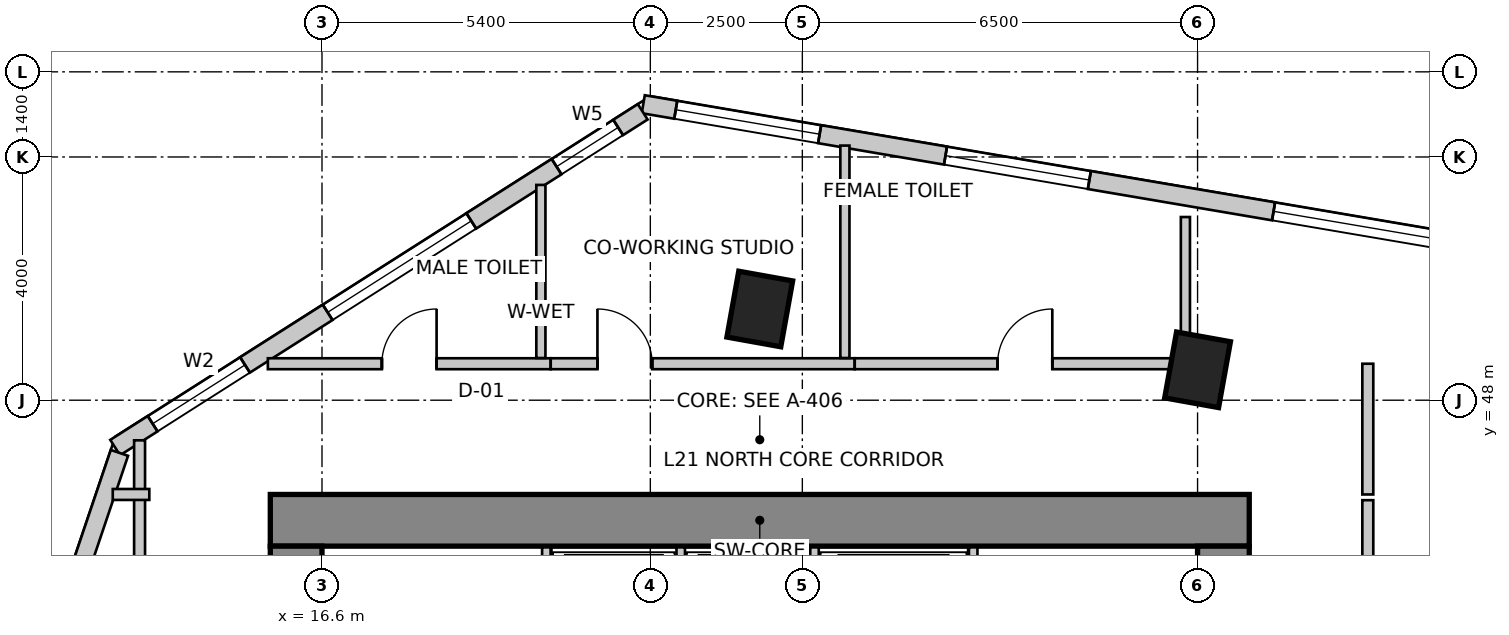
"""IFC4 building model, lengths in metres.
Left out: names, types, materials, properties, quantities, classifications, styles, units other than length and angle.
Written with IfcOpenShell. Run it as: python <this file> out.ifc"""

import sys

from ifc_helpers import new_model, si_unit, direction, frame, frame_2d, origin, origin_2d, place, context, subcontext, project, spatial, rectangle, extrude, source, transform, mapped, element, fill, save


model = new_model("IFC4")
c1 = context("Model", 3, precision=1e-05, world=origin(), true_north=direction((0.0, 1.0)))
c2 = subcontext(c1, "Body", "Model", "MODEL_VIEW")
j1 = project(units=[si_unit("LENGTHUNIT", "METRE"), si_unit("PLANEANGLEUNIT", "RADIAN")], contexts=[c1])
p1 = place(None, origin())
s1 = spatial("IfcSite", under=j1, at=p1, CompositionType="ELEMENT")
p2 = place(p1, origin())
s2 = spatial("IfcBuilding", under=s1, at=p2, CompositionType="ELEMENT")
p3 = place(p2, frame((0.0, 0.0, 87.0)))
s3 = spatial("IfcBuildingStorey", under=s2, at=p3, CompositionType="ELEMENT", Elevation=87.0)
p4 = place(p3, frame((15.75, 46.025, 0.0), z_axis=(0.0, 0.0, 1.0), x_axis=(1.0, 0.0, 0.0)))
e1 = element("IfcWall", 1, at=p4, inside=s3, PredefinedType="SHEAR", context=c2, shape_type="SweptSolid", body=[
    extrude(rectangle(XDim=16.1, YDim=0.85, at=frame_2d((8.05, 0.0))), origin(), (0.0, 0.0, 1.0), 4.0),
])
p5 = place(p3, frame((16.175, 34.2, 0.0), z_axis=(0.0, 0.0, 1.0), x_axis=(0.0, 1.0, 0.0)))
e2 = element("IfcWall", 2, at=p5, inside=s3, PredefinedType="SHEAR", context=c2, shape_type="SweptSolid", body=[
    extrude(rectangle(XDim=11.4, YDim=0.85, at=frame_2d((5.7, 0.0))), origin(), (0.0, 0.0, 1.0), 4.0),
])
m1 = source(origin(), c2, "Body", "SweptSolid", [
    extrude(rectangle(XDim=1.1, YDim=2.15, at=frame_2d((0.55, 1.075))), frame((0.0, 0.435, 0.0), z_axis=(0.0, -1.0, 0.0), x_axis=(1.0, 0.0, 0.0)), (0.0, 0.0, 1.0), 0.87),
])
p6 = place(p5, frame((7.15, 0.0, 0.0)))
e3 = element("IfcOpeningElement", 3, at=p6, cuts=e2, PredefinedType="OPENING", context=c2, shape_type="MappedRepresentation", body=[
    mapped(m1, transform((0.0, 0.0, 0.0), scale=1.0)),
])
p7 = place(p3, frame((31.425, 34.2, 0.0), z_axis=(0.0, 0.0, 1.0), x_axis=(0.0, 1.0, 0.0)))
e4 = element("IfcWall", 4, at=p7, inside=s3, PredefinedType="SHEAR", context=c2, shape_type="SweptSolid", body=[
    extrude(rectangle(XDim=11.4, YDim=0.85, at=frame_2d((5.7, 0.0))), origin(), (0.0, 0.0, 1.0), 4.0),
])
p8 = place(p7, frame((7.35, 0.0, 0.0)))
e5 = element("IfcOpeningElement", 5, at=p8, cuts=e4, PredefinedType="OPENING", context=c2, shape_type="MappedRepresentation", body=[
    mapped(m1, transform((0.0, 0.0, 0.0), scale=1.0)),
])
m2 = source(origin(), c2, "Body", "SweptSolid", [
    extrude(rectangle(XDim=0.9, YDim=1.1, at=origin_2d()), origin(), (0.0, 0.0, 1.0), 4.0),
])
for number, where, z_axis, x_axis in (
    (6, (23.8, 49.5, 0.0), (0.0, 0.0, 1.0), (0.984, -0.177, 0.0)),
    (7, (31.0, 48.5, 0.0), (0.0, 0.0, 1.0), (0.984, -0.177, 0.0)),
):
    element("IfcColumn", number, at=place(p3, frame(where, z_axis=z_axis, x_axis=x_axis)), inside=s3, PredefinedType="COLUMN", context=c2, shape_type="MappedRepresentation", body=[
        mapped(m2, transform((0.0, 0.0, 0.0), scale=1.0)),
    ])
p9 = place(p3, frame((53.961, 47.417, 0.0), z_axis=(0.0, 0.0, 1.0), x_axis=(-0.985865713455, 0.167537443678, 0.0)))
e8 = element("IfcWall", 8, at=p9, inside=s3, PredefinedType="SOLIDWALL", context=c2, shape_type="SweptSolid", body=[
    extrude(rectangle(XDim=32.537, YDim=0.3, at=frame_2d((16.269, 0.0))), origin(), (0.0, 0.0, 1.0), 3.75),
])
m3 = source(origin(), c2, "Body", "SweptSolid", [
    extrude(rectangle(XDim=2.1, YDim=2.0, at=frame_2d((1.05, 1.0))), frame((0.0, 0.16, 0.0), z_axis=(0.0, -1.0, 0.0), x_axis=(1.0, 0.0, 0.0)), (0.0, 0.0, 1.0), 0.32),
])
p10 = place(p9, frame((0.626, 0.0, 0.85)))
e9 = element("IfcOpeningElement", 9, at=p10, cuts=e8, PredefinedType="OPENING", context=c2, shape_type="MappedRepresentation", body=[
    mapped(m3, transform((0.0, 0.0, 0.0), scale=1.0)),
])
m4 = source(origin(), c2, "Body", "SweptSolid", [
    extrude(rectangle(XDim=2.4, YDim=2.2, at=frame_2d((1.2, 1.1))), frame((0.0, 0.16, 0.0), z_axis=(0.0, -1.0, 0.0), x_axis=(1.0, 0.0, 0.0)), (0.0, 0.0, 1.0), 0.32),
])
p11 = place(p9, frame((4.504, 0.0, 0.85)))
e10 = element("IfcOpeningElement", 10, at=p11, cuts=e8, PredefinedType="OPENING", context=c2, shape_type="MappedRepresentation", body=[
    mapped(m4, transform((0.0, 0.0, 0.0), scale=1.0)),
])
m5 = source(origin(), c2, "Body", "SweptSolid", [
    extrude(rectangle(XDim=2.8, YDim=2.4, at=frame_2d((1.4, 1.2))), frame((0.0, 0.16, 0.0), z_axis=(0.0, -1.0, 0.0), x_axis=(1.0, 0.0, 0.0)), (0.0, 0.0, 1.0), 0.32),
])
p12 = place(p9, frame((8.768, 0.0, 0.85)))
e11 = element("IfcOpeningElement", 11, at=p12, cuts=e8, PredefinedType="OPENING", context=c2, shape_type="MappedRepresentation", body=[
    mapped(m5, transform((0.0, 0.0, 0.0), scale=1.0)),
])
p13 = place(p9, frame((14.234, 0.0, 0.85)))
e12 = element("IfcOpeningElement", 12, at=p13, cuts=e8, PredefinedType="OPENING", context=c2, shape_type="MappedRepresentation", body=[
    mapped(m4, transform((0.0, 0.0, 0.0), scale=1.0)),
])
p14 = place(p9, frame((19.222, 0.0, 0.85)))
e13 = element("IfcOpeningElement", 13, at=p14, cuts=e8, PredefinedType="OPENING", context=c2, shape_type="MappedRepresentation", body=[
    mapped(m5, transform((0.0, 0.0, 0.0), scale=1.0)),
])
p15 = place(p9, frame((25.095, 0.0, 0.85)))
e14 = element("IfcOpeningElement", 14, at=p15, cuts=e8, PredefinedType="OPENING", context=c2, shape_type="MappedRepresentation", body=[
    mapped(m4, transform((0.0, 0.0, 0.0), scale=1.0)),
])
p16 = place(p9, frame((29.595, 0.0, 0.85)))
e15 = element("IfcOpeningElement", 15, at=p16, cuts=e8, PredefinedType="OPENING", context=c2, shape_type="MappedRepresentation", body=[
    mapped(m4, transform((0.0, 0.0, 0.0), scale=1.0)),
])
p17 = place(p3, frame((21.875, 52.742, 0.0), z_axis=(0.0, 0.0, 1.0), x_axis=(-0.843662465249, -0.536873956092, 0.0)))
e16 = element("IfcWall", 16, at=p17, inside=s3, PredefinedType="SOLIDWALL", context=c2, shape_type="SweptSolid", body=[
    extrude(rectangle(XDim=10.284, YDim=0.3, at=frame_2d((5.142, 0.0))), origin(), (0.0, 0.0, 1.0), 3.75),
])
m6 = source(origin(), c2, "Body", "SweptSolid", [
    extrude(rectangle(XDim=1.2, YDim=1.6, at=frame_2d((0.6, 0.8))), frame((0.0, 0.16, 0.0), z_axis=(0.0, -1.0, 0.0), x_axis=(1.0, 0.0, 0.0)), (0.0, 0.0, 1.0), 0.32),
])
p18 = place(p17, frame((0.479, 0.0, 0.85)))
e17 = element("IfcOpeningElement", 17, at=p18, cuts=e16, PredefinedType="OPENING", context=c2, shape_type="MappedRepresentation", body=[
    mapped(m6, transform((0.0, 0.0, 0.0), scale=1.0)),
])
p19 = place(p17, frame((3.342, 0.0, 0.85)))
e18 = element("IfcOpeningElement", 18, at=p19, cuts=e16, PredefinedType="OPENING", context=c2, shape_type="MappedRepresentation", body=[
    mapped(m5, transform((0.0, 0.0, 0.0), scale=1.0)),
])
m7 = source(origin(), c2, "Body", "SweptSolid", [
    extrude(rectangle(XDim=1.8, YDim=2.1, at=frame_2d((0.9, 1.05))), frame((0.0, 0.16, 0.0), z_axis=(0.0, -1.0, 0.0), x_axis=(1.0, 0.0, 0.0)), (0.0, 0.0, 1.0), 0.32),
])
p20 = place(p17, frame((7.753, 0.0, 0.85)))
e19 = element("IfcOpeningElement", 19, at=p20, cuts=e16, PredefinedType="OPENING", context=c2, shape_type="MappedRepresentation", body=[
    mapped(m7, transform((0.0, 0.0, 0.0), scale=1.0)),
])
p21 = place(p3, frame((13.269, 47.134, 0.0), z_axis=(0.0, 0.0, 1.0), x_axis=(-0.319920423265, -0.947444416722, 0.0)))
e20 = element("IfcWall", 20, at=p21, inside=s3, PredefinedType="SOLIDWALL", context=c2, shape_type="SweptSolid", body=[
    extrude(rectangle(XDim=16.135, YDim=0.3, at=frame_2d((8.067, 0.0))), origin(), (0.0, 0.0, 1.0), 3.75),
])
p22 = place(p21, frame((2.188, 0.0, 0.85)))
e21 = element("IfcOpeningElement", 21, at=p22, cuts=e20, PredefinedType="OPENING", context=c2, shape_type="MappedRepresentation", body=[
    mapped(m4, transform((0.0, 0.0, 0.0), scale=1.0)),
])
p23 = place(p21, frame((6.959, 0.0, 0.85)))
e22 = element("IfcOpeningElement", 22, at=p23, cuts=e20, PredefinedType="OPENING", context=c2, shape_type="MappedRepresentation", body=[
    mapped(m5, transform((0.0, 0.0, 0.0), scale=1.0)),
])
p24 = place(p21, frame((12.13, 0.0, 0.85)))
e23 = element("IfcOpeningElement", 23, at=p24, cuts=e20, PredefinedType="OPENING", context=c2, shape_type="MappedRepresentation", body=[
    mapped(m4, transform((0.0, 0.0, 0.0), scale=1.0)),
])
for number, where, z_axis, x_axis in (
    (24, (20.29, 43.28, 0.0), (0.0, 0.0, 1.0), (0.0, 1.0, 0.0)),
    (25, (27.31, 43.28, 0.0), (0.0, 0.0, 1.0), (0.0, 1.0, 0.0)),
):
    element("IfcWall", number, at=place(p3, frame(where, z_axis=z_axis, x_axis=x_axis)), inside=s3, PredefinedType="SOLIDWALL", context=c2, shape_type="SweptSolid", body=[
        extrude(rectangle(XDim=2.3, YDim=0.14, at=frame_2d((1.15, 0.0))), origin(), (0.0, 0.0, 1.0), 3.75),
    ])
for number, where, z_axis, x_axis in (
    (26, (22.5, 43.02, 0.0), (0.0, 0.0, 1.0), (0.0, 1.0, 0.0)),
    (27, (24.7, 43.02, 0.0), (0.0, 0.0, 1.0), (0.0, 1.0, 0.0)),
):
    element("IfcWall", number, at=place(p3, frame(where, z_axis=z_axis, x_axis=x_axis)), inside=s3, PredefinedType="SOLIDWALL", context=c2, shape_type="SweptSolid", body=[
        extrude(rectangle(XDim=2.56, YDim=0.14, at=frame_2d((1.28, 0.0))), origin(), (0.0, 0.0, 1.0), 3.75),
    ])
p25 = place(p3, frame((13.6, 33.444, 0.0), z_axis=(0.0, 0.0, 1.0), x_axis=(0.0, 1.0, 0.0)))
e28 = element("IfcWall", 28, at=p25, inside=s3, PredefinedType="PARTITIONING", context=c2, shape_type="SweptSolid", body=[
    extrude(rectangle(XDim=13.896, YDim=0.18, at=frame_2d((6.948, 0.0))), origin(), (0.0, 0.0, 1.0), 2.892),
])
m8 = source(origin(), c2, "Body", "SweptSolid", [
    extrude(rectangle(XDim=0.9, YDim=2.15, at=frame_2d((0.45, 1.075))), frame((0.0, 0.1, 0.0), z_axis=(0.0, -1.0, 0.0), x_axis=(1.0, 0.0, 0.0)), (0.0, 0.0, 1.0), 0.2),
])
p26 = place(p25, frame((4.144, 0.0, 0.0)))
e29 = element("IfcOpeningElement", 29, at=p26, cuts=e28, PredefinedType="OPENING", context=c2, shape_type="MappedRepresentation", body=[
    mapped(m8, transform((0.0, 0.0, 0.0), scale=1.0)),
])
p27 = place(p3, frame((13.76, 46.45, 0.0), z_axis=(0.0, 0.0, 1.0), x_axis=(-1.0, 0.0, 0.0)))
e30 = element("IfcWall", 30, at=p27, inside=s3, PredefinedType="PARTITIONING", context=c2, shape_type="SweptSolid", body=[
    extrude(rectangle(XDim=0.601, YDim=0.18, at=frame_2d((0.301, 0.0))), origin(), (0.0, 0.0, 1.0), 3.75),
])
p28 = place(p3, frame((15.71, 48.6, 0.0), z_axis=(0.0, 0.0, 1.0), x_axis=(1.0, 0.0, 0.0)))
e31 = element("IfcWall", 31, at=p28, inside=s3, PredefinedType="PARTITIONING", context=c2, shape_type="SweptSolid", body=[
    extrude(rectangle(XDim=4.65, YDim=0.18, at=frame_2d((2.325, 0.0))), origin(), (0.0, 0.0, 1.0), 3.75),
])
p29 = place(p28, frame((1.875, 0.0, 0.0)))
e32 = element("IfcOpeningElement", 32, at=p29, cuts=e31, PredefinedType="OPENING", context=c2, shape_type="MappedRepresentation", body=[
    mapped(m8, transform((0.0, 0.0, 0.0), scale=1.0)),
])
p30 = place(p3, frame((20.362, 48.6, 0.0), z_axis=(0.0, 0.0, 1.0), x_axis=(1.0, 0.0, 0.0)))
e33 = element("IfcWall", 33, at=p30, inside=s3, PredefinedType="PARTITIONING", context=c2, shape_type="SweptSolid", body=[
    extrude(rectangle(XDim=4.998, YDim=0.18, at=frame_2d((2.499, 0.0))), origin(), (0.0, 0.0, 1.0), 3.335),
])
p31 = place(p30, frame((0.768, 0.0, 0.0)))
e34 = element("IfcOpeningElement", 34, at=p31, cuts=e33, PredefinedType="OPENING", context=c2, shape_type="MappedRepresentation", body=[
    mapped(m8, transform((0.0, 0.0, 0.0), scale=1.0)),
])
p32 = place(p3, frame((25.362, 48.6, 0.0), z_axis=(0.0, 0.0, 1.0), x_axis=(1.0, 0.0, 0.0)))
e35 = element("IfcWall", 35, at=p32, inside=s3, PredefinedType="PARTITIONING", context=c2, shape_type="SweptSolid", body=[
    extrude(rectangle(XDim=5.598, YDim=0.18, at=frame_2d((2.799, 0.0))), origin(), (0.0, 0.0, 1.0), 2.892),
])
p33 = place(p32, frame((2.349, 0.0, 0.0)))
e36 = element("IfcOpeningElement", 36, at=p33, cuts=e35, PredefinedType="OPENING", context=c2, shape_type="MappedRepresentation", body=[
    mapped(m8, transform((0.0, 0.0, 0.0), scale=1.0)),
])
p34 = place(p3, frame((33.8, 48.6, 0.0), z_axis=(0.0, 0.0, 1.0), x_axis=(0.0, -1.0, 0.0)))
e37 = element("IfcWall", 37, at=p34, inside=s3, PredefinedType="PARTITIONING", context=c2, shape_type="SweptSolid", body=[
    extrude(rectangle(XDim=2.15, YDim=0.18, at=frame_2d((1.075, 0.0))), origin(), (0.0, 0.0, 1.0), 2.892),
])
p35 = place(p3, frame((33.8, 46.356, 0.0), z_axis=(0.0, 0.0, 1.0), x_axis=(0.0, -1.0, 0.0)))
e38 = element("IfcWall", 38, at=p35, inside=s3, PredefinedType="PARTITIONING", context=c2, shape_type="SweptSolid", body=[
    extrude(rectangle(XDim=3.716, YDim=0.18, at=frame_2d((1.858, 0.0))), origin(), (0.0, 0.0, 1.0), 3.188),
])
p36 = place(p3, frame((20.2, 51.54, 0.0), z_axis=(0.0, 0.0, 1.0), x_axis=(0.0, -1.0, 0.0)))
e39 = element("IfcWall", 39, at=p36, inside=s3, PredefinedType="PARTITIONING", context=c2, shape_type="SweptSolid", body=[
    extrude(rectangle(XDim=2.846, YDim=0.15, at=frame_2d((1.423, 0.0))), origin(), (0.0, 0.0, 1.0), 3.75),
])
p37 = place(p3, frame((25.2, 52.188, 0.0), z_axis=(0.0, 0.0, 1.0), x_axis=(0.0, -1.0, 0.0)))
e40 = element("IfcWall", 40, at=p37, inside=s3, PredefinedType="PARTITIONING", context=c2, shape_type="SweptSolid", body=[
    extrude(rectangle(XDim=3.493, YDim=0.15, at=frame_2d((1.747, 0.0))), origin(), (0.0, 0.0, 1.0), 2.892),
])
p38 = place(p3, frame((30.8, 51.013, 0.0), z_axis=(0.0, 0.0, 1.0), x_axis=(0.0, -1.0, 0.0)))
e41 = element("IfcWall", 41, at=p38, inside=s3, PredefinedType="PARTITIONING", context=c2, shape_type="SweptSolid", body=[
    extrude(rectangle(XDim=2.193, YDim=0.15, at=frame_2d((1.096, 0.0))), origin(), (0.0, 0.0, 1.0), 3.75),
])
m9 = source(origin(), c2, "Body", "SweptSolid", [
    extrude(rectangle(XDim=2.8, YDim=2.4, at=frame_2d((1.4, 1.2))), frame((0.0, -0.015, 0.0), z_axis=(0.0, -1.0, 0.0), x_axis=(1.0, 0.0, 0.0)), (0.0, 0.0, 1.0), 0.06),
])
p39 = place(p14, origin())
e42 = element("IfcWindow", 42, at=p39, inside=s3, PartitioningType="SINGLE_PANEL", PredefinedType="WINDOW", context=c2, shape_type="MappedRepresentation", body=[
    mapped(m9, transform((0.0, 0.0, 0.0), scale=1.0)),
])
fill(e13, e42)
m10 = source(origin(), c2, "Body", "SweptSolid", [
    extrude(rectangle(XDim=2.4, YDim=2.2, at=frame_2d((1.2, 1.1))), frame((0.0, -0.015, 0.0), z_axis=(0.0, -1.0, 0.0), x_axis=(1.0, 0.0, 0.0)), (0.0, 0.0, 1.0), 0.06),
])
p40 = place(p15, origin())
e43 = element("IfcWindow", 43, at=p40, inside=s3, PartitioningType="SINGLE_PANEL", PredefinedType="WINDOW", context=c2, shape_type="MappedRepresentation", body=[
    mapped(m10, transform((0.0, 0.0, 0.0), scale=1.0)),
])
fill(e14, e43)
p41 = place(p16, origin())
e44 = element("IfcWindow", 44, at=p41, inside=s3, PartitioningType="SINGLE_PANEL", PredefinedType="WINDOW", context=c2, shape_type="MappedRepresentation", body=[
    mapped(m10, transform((0.0, 0.0, 0.0), scale=1.0)),
])
fill(e15, e44)
m11 = source(origin(), c2, "Body", "SweptSolid", [
    extrude(rectangle(XDim=1.2, YDim=1.6, at=frame_2d((0.6, 0.8))), frame((0.0, -0.015, 0.0), z_axis=(0.0, -1.0, 0.0), x_axis=(1.0, 0.0, 0.0)), (0.0, 0.0, 1.0), 0.06),
])
p42 = place(p18, origin())
e45 = element("IfcWindow", 45, at=p42, inside=s3, PartitioningType="SINGLE_PANEL", PredefinedType="WINDOW", context=c2, shape_type="MappedRepresentation", body=[
    mapped(m11, transform((0.0, 0.0, 0.0), scale=1.0)),
])
fill(e17, e45)
p43 = place(p19, origin())
e46 = element("IfcWindow", 46, at=p43, inside=s3, PartitioningType="SINGLE_PANEL", PredefinedType="WINDOW", context=c2, shape_type="MappedRepresentation", body=[
    mapped(m9, transform((0.0, 0.0, 0.0), scale=1.0)),
])
fill(e18, e46)
m12 = source(origin(), c2, "Body", "SweptSolid", [
    extrude(rectangle(XDim=1.8, YDim=2.1, at=frame_2d((0.9, 1.05))), frame((0.0, -0.015, 0.0), z_axis=(0.0, -1.0, 0.0), x_axis=(1.0, 0.0, 0.0)), (0.0, 0.0, 1.0), 0.06),
])
p44 = place(p20, origin())
e47 = element("IfcWindow", 47, at=p44, inside=s3, PartitioningType="SINGLE_PANEL", PredefinedType="WINDOW", context=c2, shape_type="MappedRepresentation", body=[
    mapped(m12, transform((0.0, 0.0, 0.0), scale=1.0)),
])
fill(e19, e47)
m13 = source(origin(), c2, "Body", "SweptSolid", [
    extrude(rectangle(XDim=0.9, YDim=2.15, at=frame_2d((0.45, 1.075))), frame((0.0, 0.025, 0.0), z_axis=(0.0, -1.0, 0.0), x_axis=(1.0, 0.0, 0.0)), (0.0, 0.0, 1.0), 0.05),
])
p45 = place(p29, origin())
e48 = element("IfcDoor", 48, at=p45, inside=s3, OperationType="SINGLE_SWING_RIGHT", PredefinedType="DOOR", context=c2, shape_type="MappedRepresentation", body=[
    mapped(m13, transform((0.0, 0.0, 0.0), scale=1.0)),
])
fill(e32, e48)
p46 = place(p31, origin())
e49 = element("IfcDoor", 49, at=p46, inside=s3, OperationType="SINGLE_SWING_LEFT", PredefinedType="DOOR", context=c2, shape_type="MappedRepresentation", body=[
    mapped(m13, transform((0.0, 0.0, 0.0), scale=1.0)),
])
fill(e34, e49)
p47 = place(p33, origin())
e50 = element("IfcDoor", 50, at=p47, inside=s3, OperationType="SINGLE_SWING_RIGHT", PredefinedType="DOOR", context=c2, shape_type="MappedRepresentation", body=[
    mapped(m13, transform((0.0, 0.0, 0.0), scale=1.0)),
])
fill(e36, e50)
save(model, sys.argv[1])
